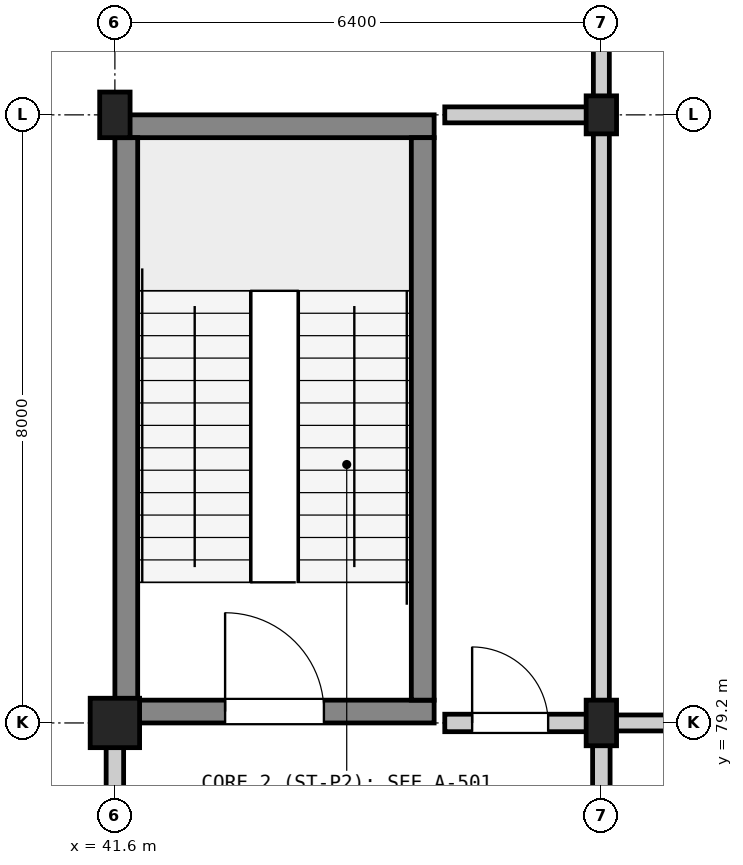
"""IFC4 building model, lengths in metres.
Left out: names, types, materials, properties, quantities, classifications, styles, units other than length and angle.
Written with IfcOpenShell. Run it as: python <this file> out.ifc"""

import sys

from ifc_helpers import new_model, si_unit, direction, frame, frame_2d, origin, origin_2d, place, context, subcontext, project, spatial, rectangle, extrude, element, fill, save


model = new_model("IFC4")
c1 = context("Model", 3, precision=1e-05, world=origin(), true_north=direction((0.0, 1.0)))
c2 = subcontext(c1, "Body", "Model", "MODEL_VIEW")
j1 = project(units=[si_unit("LENGTHUNIT", "METRE"), si_unit("PLANEANGLEUNIT", "RADIAN")], contexts=[c1])
p1 = place(None, origin())
s1 = spatial("IfcSite", under=j1, at=p1, CompositionType="ELEMENT")
p2 = place(p1, origin())
s2 = spatial("IfcBuilding", under=s1, at=p2, CompositionType="ELEMENT")
p3 = place(p2, frame((0.0, 0.0, -4.5)))
s3 = spatial("IfcBuildingStorey", under=s2, at=p3, CompositionType="ELEMENT", Elevation=-4.5)
p4 = place(p3, frame((41.6, 79.2, 0.0), z_axis=(0.0, 0.0, 1.0), x_axis=(1.0, 0.0, 0.0)))
e1 = element("IfcColumn", 1, at=p4, inside=s3, PredefinedType="COLUMN", context=c2, shape_type="SweptSolid", body=[
    extrude(rectangle(XDim=0.65, YDim=0.65, at=origin_2d()), origin(), (0.0, 0.0, 1.0), 4.5),
])
for number, where, z_axis, x_axis in (
    (2, (41.6, 87.2, 0.0), (0.0, 0.0, 1.0), (1.0, 0.0, 0.0)),
    (3, (48.0, 79.2, 0.0), (0.0, 0.0, 1.0), (1.0, 0.0, 0.0)),
):
    element("IfcColumn", number, at=place(p3, frame(where, z_axis=z_axis, x_axis=x_axis)), inside=s3, PredefinedType="COLUMN", context=c2, shape_type="SweptSolid", body=[
        extrude(rectangle(XDim=0.4, YDim=0.6, at=origin_2d()), origin(), (0.0, 0.0, 1.0), 4.5),
    ])
p5 = place(p3, frame((48.0, 87.2, 0.0), z_axis=(0.0, 0.0, 1.0), x_axis=(1.0, 0.0, 0.0)))
e4 = element("IfcColumn", 4, at=p5, inside=s3, PredefinedType="COLUMN", context=c2, shape_type="SweptSolid", body=[
    extrude(rectangle(XDim=0.4, YDim=0.5, at=origin_2d()), origin(), (0.0, 0.0, 1.0), 4.5),
])
p6 = place(p3, frame((41.6, 79.35, 0.0), z_axis=(0.0, 0.0, 1.0), x_axis=(1.0, 0.0, 0.0)))
e5 = element("IfcWall", 5, at=p6, inside=s3, PredefinedType="SHEAR", context=c2, shape_type="SweptSolid", body=[
    extrude(rectangle(XDim=4.2, YDim=0.3, at=frame_2d((2.1, 0.0))), origin(), (0.0, 0.0, 1.0), 4.08),
])
p7 = place(p6, frame((1.45, 0.0, 0.0)))
e6 = element("IfcOpeningElement", 6, at=p7, cuts=e5, PredefinedType="OPENING", context=c2, shape_type="SweptSolid", body=[
    extrude(rectangle(XDim=1.3, YDim=2.18, at=frame_2d((0.65, 1.09))), frame((0.0, 0.162, 0.0), z_axis=(0.0, -1.0, 0.0), x_axis=(1.0, 0.0, 0.0)), (0.0, 0.0, 1.0), 0.324),
])
p8 = place(p3, frame((41.6, 87.05, 0.0), z_axis=(0.0, 0.0, 1.0), x_axis=(1.0, 0.0, 0.0)))
e7 = element("IfcWall", 7, at=p8, inside=s3, PredefinedType="SHEAR", context=c2, shape_type="SweptSolid", body=[
    extrude(rectangle(XDim=4.2, YDim=0.3, at=frame_2d((2.1, 0.0))), origin(), (0.0, 0.0, 1.0), 4.08),
])
for number, where, z_axis, x_axis in (
    (8, (41.75, 79.5, 0.0), (0.0, 0.0, 1.0), (0.0, 1.0, 0.0)),
    (9, (45.65, 79.5, 0.0), (0.0, 0.0, 1.0), (0.0, 1.0, 0.0)),
):
    element("IfcWall", number, at=place(p3, frame(where, z_axis=z_axis, x_axis=x_axis)), inside=s3, PredefinedType="SHEAR", context=c2, shape_type="SweptSolid", body=[
        extrude(rectangle(XDim=7.4, YDim=0.3, at=frame_2d((3.7, 0.0))), origin(), (0.0, 0.0, 1.0), 4.08),
    ])
p9 = place(p3, frame((45.94, 79.2, 0.0), z_axis=(0.0, 0.0, 1.0), x_axis=(1.0, 0.0, 0.0)))
e10 = element("IfcWall", 10, at=p9, inside=s3, PredefinedType="SOLIDWALL", context=c2, shape_type="SweptSolid", body=[
    extrude(rectangle(XDim=1.92, YDim=0.23, at=frame_2d((0.96, 0.0))), origin(), (0.0, 0.0, 1.0), 3.625),
])
p10 = place(p9, frame((0.36, 0.0, 0.0)))
e11 = element("IfcOpeningElement", 11, at=p10, cuts=e10, PredefinedType="OPENING", context=c2, shape_type="SweptSolid", body=[
    extrude(rectangle(XDim=1.0, YDim=2.15, at=frame_2d((0.5, 1.075))), frame((0.0, 0.127, 0.0), z_axis=(0.0, -1.0, 0.0), x_axis=(1.0, 0.0, 0.0)), (0.0, 0.0, 1.0), 0.254),
])
p11 = place(p3, frame((41.6, 75.54, 0.0), z_axis=(0.0, 0.0, 1.0), x_axis=(0.0, 1.0, 0.0)))
e12 = element("IfcWall", 12, at=p11, inside=s3, PredefinedType="SOLIDWALL", context=c2, shape_type="SweptSolid", body=[
    extrude(rectangle(XDim=3.52, YDim=0.23, at=frame_2d((1.76, 0.0))), origin(), (0.0, 0.0, 1.0), 3.375),
])
p12 = place(p3, frame((48.0, 75.54, 0.0), z_axis=(0.0, 0.0, 1.0), x_axis=(0.0, 1.0, 0.0)))
e13 = element("IfcWall", 13, at=p12, inside=s3, PredefinedType="SOLIDWALL", context=c2, shape_type="SweptSolid", body=[
    extrude(rectangle(XDim=3.52, YDim=0.23, at=frame_2d((1.76, 0.0))), origin(), (0.0, 0.0, 1.0), 3.425),
])
p13 = place(p3, frame((45.94, 87.2, 0.0), z_axis=(0.0, 0.0, 1.0), x_axis=(1.0, 0.0, 0.0)))
e14 = element("IfcWall", 14, at=p13, inside=s3, PredefinedType="SOLIDWALL", context=c2, shape_type="SweptSolid", body=[
    extrude(rectangle(XDim=1.92, YDim=0.21, at=frame_2d((0.96, 0.0))), origin(), (0.0, 0.0, 1.0), 3.525),
])
p14 = place(p3, frame((48.0, 79.34, 0.0), z_axis=(0.0, 0.0, 1.0), x_axis=(0.0, 1.0, 0.0)))
e15 = element("IfcWall", 15, at=p14, inside=s3, PredefinedType="SOLIDWALL", context=c2, shape_type="SweptSolid", body=[
    extrude(rectangle(XDim=7.72, YDim=0.21, at=frame_2d((3.86, 0.0))), origin(), (0.0, 0.0, 1.0), 3.525),
])
p15 = place(p3, frame((48.14, 79.2, 0.0), z_axis=(0.0, 0.0, 1.0), x_axis=(1.0, 0.0, 0.0)))
e16 = element("IfcWall", 16, at=p15, inside=s3, PredefinedType="SOLIDWALL", context=c2, shape_type="SweptSolid", body=[
    extrude(rectangle(XDim=24.12, YDim=0.21, at=frame_2d((12.06, 0.0))), origin(), (0.0, 0.0, 1.0), 2.925),
])
p16 = place(p3, frame((48.0, 87.2, 0.0), z_axis=(0.0, 0.0, 1.0), x_axis=(0.0, 1.0, 0.0)))
e17 = element("IfcWall", 17, at=p16, inside=s3, PredefinedType="SOLIDWALL", context=c2, shape_type="SweptSolid", body=[
    extrude(rectangle(XDim=7.895, YDim=0.21, at=frame_2d((3.948, 0.0))), origin(), (0.0, 0.0, 1.0), 3.575),
])
p17 = place(p7, origin())
e18 = element("IfcDoor", 18, at=p17, inside=s3, OperationType="SINGLE_SWING_LEFT", PredefinedType="DOOR", context=c2, shape_type="SweptSolid", body=[
    extrude(rectangle(XDim=1.3, YDim=2.18, at=frame_2d((0.65, 1.09))), frame((0.0, 0.025, 0.0), z_axis=(0.0, -1.0, 0.0), x_axis=(1.0, 0.0, 0.0)), (0.0, 0.0, 1.0), 0.05),
])
fill(e6, e18)
p18 = place(p10, origin())
e19 = element("IfcDoor", 19, at=p18, inside=s3, OperationType="SINGLE_SWING_LEFT", PredefinedType="DOOR", context=c2, shape_type="SweptSolid", body=[
    extrude(rectangle(XDim=1.0, YDim=2.15, at=frame_2d((0.5, 1.075))), frame((0.0, 0.025, 0.0), z_axis=(0.0, -1.0, 0.0), x_axis=(1.0, 0.0, 0.0)), (0.0, 0.0, 1.0), 0.05),
])
fill(e11, e19)
save(model, sys.argv[1])
